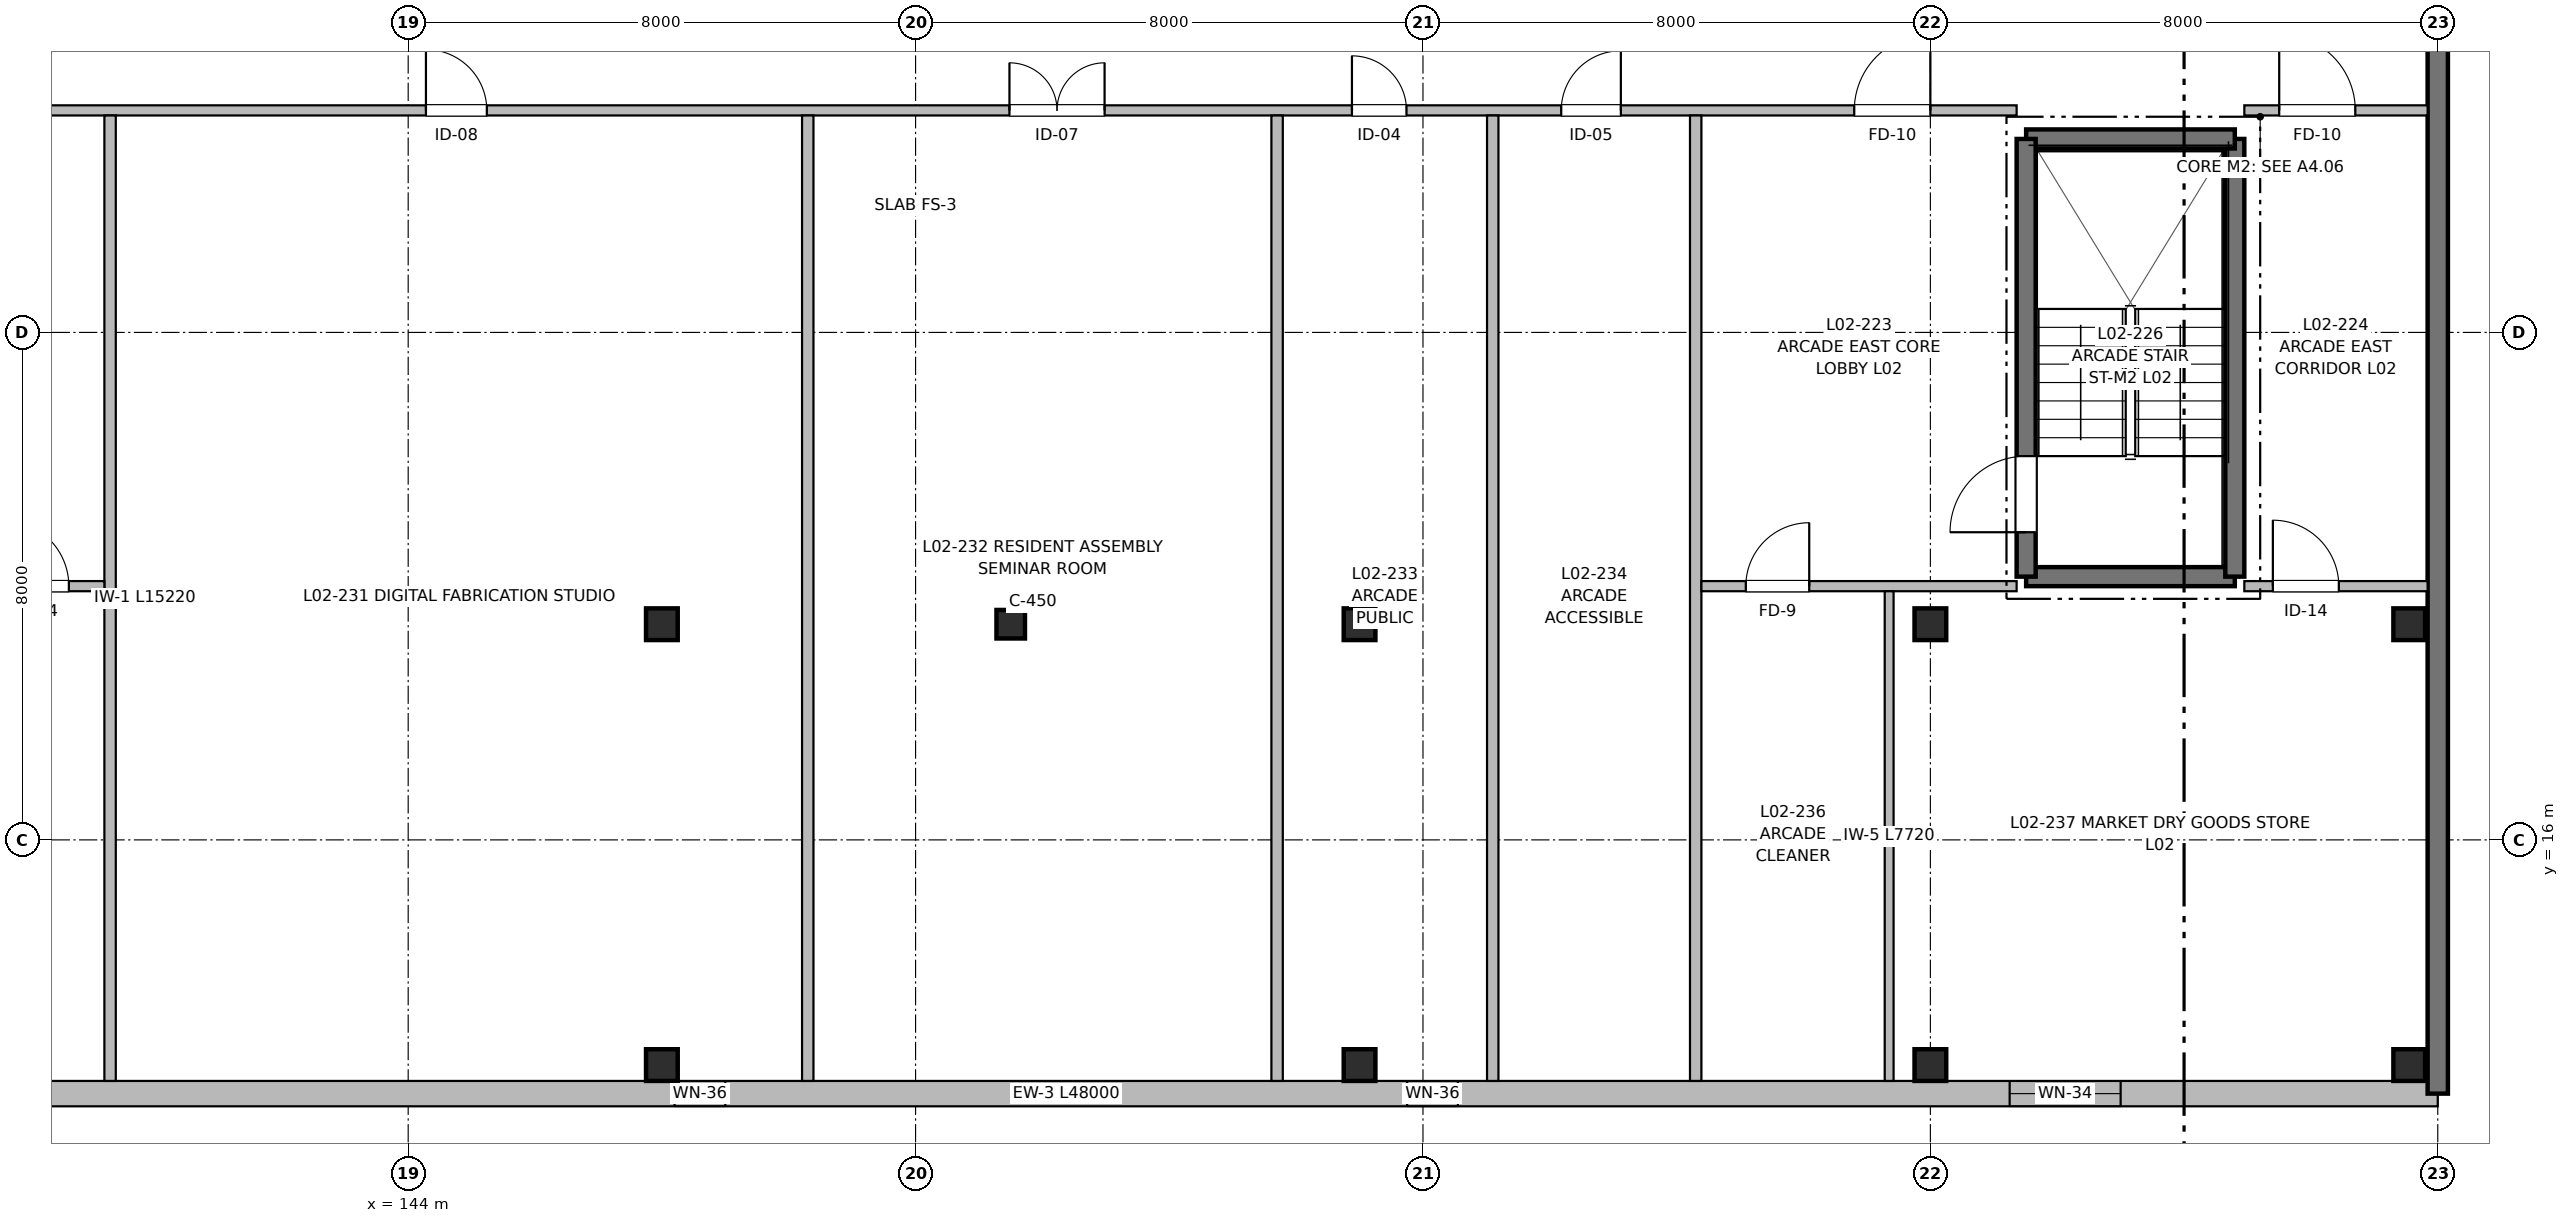
"""IFC4 building model, lengths in metres.
Left out: names, types, materials, properties, quantities, classifications, styles, units other than length and angle.
Written with IfcOpenShell. Run it as: python <this file> out.ifc"""

import sys

from ifc_helpers import new_model, si_unit, direction, frame, frame_2d, origin, origin_2d, place, context, subcontext, project, spatial, rectangle, extrude, element, fill, save


model = new_model("IFC4")
c1 = context("Model", 3, precision=1e-05, world=origin(), true_north=direction((0.0, 1.0)))
c2 = subcontext(c1, "Body", "Model", "MODEL_VIEW")
j1 = project(units=[si_unit("LENGTHUNIT", "METRE"), si_unit("PLANEANGLEUNIT", "RADIAN")], contexts=[c1])
p1 = place(None, origin())
s1 = spatial("IfcSite", under=j1, at=p1, CompositionType="ELEMENT")
p2 = place(p1, origin())
s2 = spatial("IfcBuilding", under=s1, at=p2, CompositionType="ELEMENT")
p3 = place(p2, frame((0.0, 0.0, 7.36)))
s3 = spatial("IfcBuildingStorey", under=s2, at=p3, CompositionType="ELEMENT", Elevation=7.36)
for number, where, z_axis, x_axis in (
    (1, (148.0, 12.45, 0.0), (0.0, 0.0, 1.0), (1.0, 0.0, 0.0)),
    (2, (148.0, 19.4, 0.0), (0.0, 0.0, 1.0), (1.0, 0.0, 0.0)),
):
    element("IfcColumn", number, at=place(p3, frame(where, z_axis=z_axis, x_axis=x_axis)), inside=s3, PredefinedType="COLUMN", context=c2, shape_type="SweptSolid", body=[
        extrude(rectangle(XDim=0.5, YDim=0.5, at=origin_2d()), origin(), (0.0, 0.0, 1.0), 3.2),
    ])
p4 = place(p3, frame((153.5, 19.4, 0.0), z_axis=(0.0, 0.0, 1.0), x_axis=(1.0, 0.0, 0.0)))
e3 = element("IfcColumn", 3, at=p4, inside=s3, PredefinedType="COLUMN", context=c2, shape_type="SweptSolid", body=[
    extrude(rectangle(XDim=0.45, YDim=0.45, at=origin_2d()), origin(), (0.0, 0.0, 1.0), 3.2),
])
for number, where, z_axis, x_axis in (
    (4, (159.0, 12.45, 0.0), (0.0, 0.0, 1.0), (1.0, 0.0, 0.0)),
    (5, (159.0, 19.4, 0.0), (0.0, 0.0, 1.0), (1.0, 0.0, 0.0)),
    (6, (168.0, 12.45, 0.0), (0.0, 0.0, 1.0), (1.0, 0.0, 0.0)),
    (7, (168.0, 19.4, 0.0), (0.0, 0.0, 1.0), (1.0, 0.0, 0.0)),
    (8, (175.55, 12.45, 0.0), (0.0, 0.0, 1.0), (1.0, 0.0, 0.0)),
    (9, (175.55, 19.4, 0.0), (0.0, 0.0, 1.0), (1.0, 0.0, 0.0)),
):
    element("IfcColumn", number, at=place(p3, frame(where, z_axis=z_axis, x_axis=x_axis)), inside=s3, PredefinedType="COLUMN", context=c2, shape_type="SweptSolid", body=[
        extrude(rectangle(XDim=0.5, YDim=0.5, at=origin_2d()), origin(), (0.0, 0.0, 1.0), 3.2),
    ])
p5 = place(p3, frame((176.0, 12.0, 0.0), z_axis=(0.0, 0.0, 1.0), x_axis=(-1.0, 0.0, 0.0)))
e10 = element("IfcWall", 10, at=p5, inside=s3, PredefinedType="SOLIDWALL", context=c2, shape_type="SweptSolid", body=[
    extrude(rectangle(XDim=48.0, YDim=0.4, at=frame_2d((24.0, 0.0))), origin(), (0.0, 0.0, 1.0), 2.95),
])
p6 = place(p5, frame((5.0, 0.0, 0.62)))
e11 = element("IfcOpeningElement", 11, at=p6, cuts=e10, PredefinedType="OPENING", context=c2, shape_type="SweptSolid", body=[
    extrude(rectangle(XDim=1.75, YDim=1.6, at=frame_2d((0.875, 0.8))), frame((0.0, 0.21, 0.0), z_axis=(0.0, -1.0, 0.0), x_axis=(1.0, 0.0, 0.0)), (0.0, 0.0, 1.0), 0.42),
])
p7 = place(p5, frame((15.45, 0.0, 1.52)))
e12 = element("IfcOpeningElement", 12, at=p7, cuts=e10, PredefinedType="OPENING", context=c2, shape_type="SweptSolid", body=[
    extrude(rectangle(XDim=0.8, YDim=0.7, at=frame_2d((0.4, 0.35))), frame((0.0, 0.21, 0.0), z_axis=(0.0, -1.0, 0.0), x_axis=(1.0, 0.0, 0.0)), (0.0, 0.0, 1.0), 0.42),
])
p8 = place(p5, frame((27.0, 0.0, 1.52)))
e13 = element("IfcOpeningElement", 13, at=p8, cuts=e10, PredefinedType="OPENING", context=c2, shape_type="SweptSolid", body=[
    extrude(rectangle(XDim=0.8, YDim=0.7, at=frame_2d((0.4, 0.35))), frame((0.0, 0.21, 0.0), z_axis=(0.0, -1.0, 0.0), x_axis=(1.0, 0.0, 0.0)), (0.0, 0.0, 1.0), 0.42),
])
p9 = place(p5, frame((38.0, 0.0, 0.45)))
e14 = element("IfcOpeningElement", 14, at=p9, cuts=e10, PredefinedType="OPENING", context=c2, shape_type="SweptSolid", body=[
    extrude(rectangle(XDim=1.55, YDim=1.85, at=frame_2d((0.775, 0.925))), frame((0.0, 0.21, 0.0), z_axis=(0.0, -1.0, 0.0), x_axis=(1.0, 0.0, 0.0)), (0.0, 0.0, 1.0), 0.42),
])
p10 = place(p3, frame((176.0, 40.0, 0.0), z_axis=(0.0, 0.0, 1.0), x_axis=(0.0, -1.0, 0.0)))
e15 = element("IfcWall", 15, at=p10, inside=s3, PredefinedType="SHEAR", context=c2, shape_type="SweptSolid", body=[
    extrude(rectangle(XDim=28.0, YDim=0.32, at=frame_2d((14.0, 0.0))), origin(), (0.0, 0.0, 1.0), 2.95),
])
p11 = place(p3, frame((172.8, 20.15, 0.0), z_axis=(0.0, 0.0, 1.0), x_axis=(-1.0, 0.0, 0.0)))
e16 = element("IfcWall", 16, at=p11, inside=s3, PredefinedType="SHEAR", context=c2, shape_type="SweptSolid", body=[
    extrude(rectangle(XDim=3.29, YDim=0.3, at=frame_2d((1.645, 0.0))), origin(), (0.0, 0.0, 1.0), 3.2),
])
p12 = place(p3, frame((172.8, 27.05, 0.0), z_axis=(0.0, 0.0, 1.0), x_axis=(0.0, -1.0, 0.0)))
e17 = element("IfcWall", 17, at=p12, inside=s3, PredefinedType="SHEAR", context=c2, shape_type="SweptSolid", body=[
    extrude(rectangle(XDim=6.9, YDim=0.3, at=frame_2d((3.45, 0.0))), origin(), (0.0, 0.0, 1.0), 3.2),
])
p13 = place(p3, frame((169.51, 27.05, 0.0), z_axis=(0.0, 0.0, 1.0), x_axis=(1.0, 0.0, 0.0)))
e18 = element("IfcWall", 18, at=p13, inside=s3, PredefinedType="SHEAR", context=c2, shape_type="SweptSolid", body=[
    extrude(rectangle(XDim=3.29, YDim=0.3, at=frame_2d((1.645, 0.0))), origin(), (0.0, 0.0, 1.0), 3.2),
])
p14 = place(p3, frame((169.51, 20.15, 0.0), z_axis=(0.0, 0.0, 1.0), x_axis=(0.0, 1.0, 0.0)))
e19 = element("IfcWall", 19, at=p14, inside=s3, PredefinedType="SHEAR", context=c2, shape_type="SweptSolid", body=[
    extrude(rectangle(XDim=6.9, YDim=0.3, at=frame_2d((3.45, 0.0))), origin(), (0.0, 0.0, 1.0), 3.2),
])
p15 = place(p14, frame((0.7, 0.0, 0.0)))
e20 = element("IfcOpeningElement", 20, at=p15, cuts=e19, PredefinedType="OPENING", context=c2, shape_type="SweptSolid", body=[
    extrude(rectangle(XDim=1.2, YDim=2.2, at=frame_2d((0.6, 1.1))), frame((0.0, 0.16, 0.0), z_axis=(0.0, -1.0, 0.0), x_axis=(1.0, 0.0, 0.0)), (0.0, 0.0, 1.0), 0.32),
])
p16 = place(p3, frame((133.35, 27.5, 0.0), z_axis=(0.0, 0.0, 1.0), x_axis=(1.0, 0.0, 0.0)))
e21 = element("IfcWall", 21, at=p16, inside=s3, PredefinedType="PARTITIONING", context=c2, shape_type="SweptSolid", body=[
    extrude(rectangle(XDim=36.01, YDim=0.16, at=frame_2d((18.005, 0.0))), origin(), (0.0, 0.0, 1.0), 2.93),
])
p17 = place(p16, frame((2.15, 0.0, 0.0)))
e22 = element("IfcOpeningElement", 22, at=p17, cuts=e21, PredefinedType="OPENING", context=c2, shape_type="SweptSolid", body=[
    extrude(rectangle(XDim=1.2, YDim=2.2, at=frame_2d((0.6, 1.1))), frame((0.0, 0.09, 0.0), z_axis=(0.0, -1.0, 0.0), x_axis=(1.0, 0.0, 0.0)), (0.0, 0.0, 1.0), 0.18),
])
p18 = place(p16, frame((33.45, 0.0, 0.0)))
e23 = element("IfcOpeningElement", 23, at=p18, cuts=e21, PredefinedType="OPENING", context=c2, shape_type="SweptSolid", body=[
    extrude(rectangle(XDim=1.2, YDim=2.2, at=frame_2d((0.6, 1.1))), frame((0.0, 0.09, 0.0), z_axis=(0.0, -1.0, 0.0), x_axis=(1.0, 0.0, 0.0)), (0.0, 0.0, 1.0), 0.18),
])
p19 = place(p16, frame((10.93, 0.0, 0.0)))
e24 = element("IfcOpeningElement", 24, at=p19, cuts=e21, PredefinedType="OPENING", context=c2, shape_type="SweptSolid", body=[
    extrude(rectangle(XDim=0.96, YDim=2.15, at=frame_2d((0.48, 1.075))), frame((0.0, 0.09, 0.0), z_axis=(0.0, -1.0, 0.0), x_axis=(1.0, 0.0, 0.0)), (0.0, 0.0, 1.0), 0.18),
])
p20 = place(p16, frame((20.13, 0.0, 0.0)))
e25 = element("IfcOpeningElement", 25, at=p20, cuts=e21, PredefinedType="OPENING", context=c2, shape_type="SweptSolid", body=[
    extrude(rectangle(XDim=1.5, YDim=2.2, at=frame_2d((0.75, 1.1))), frame((0.0, 0.09, 0.0), z_axis=(0.0, -1.0, 0.0), x_axis=(1.0, 0.0, 0.0)), (0.0, 0.0, 1.0), 0.18),
])
p21 = place(p16, frame((25.53, 0.0, 0.0)))
e26 = element("IfcOpeningElement", 26, at=p21, cuts=e21, PredefinedType="OPENING", context=c2, shape_type="SweptSolid", body=[
    extrude(rectangle(XDim=0.86, YDim=2.1, at=frame_2d((0.43, 1.05))), frame((0.0, 0.09, 0.0), z_axis=(0.0, -1.0, 0.0), x_axis=(1.0, 0.0, 0.0)), (0.0, 0.0, 1.0), 0.18),
])
p22 = place(p16, frame((28.83, 0.0, 0.0)))
e27 = element("IfcOpeningElement", 27, at=p22, cuts=e21, PredefinedType="OPENING", context=c2, shape_type="SweptSolid", body=[
    extrude(rectangle(XDim=0.94, YDim=2.1, at=frame_2d((0.47, 1.05))), frame((0.0, 0.09, 0.0), z_axis=(0.0, -1.0, 0.0), x_axis=(1.0, 0.0, 0.0)), (0.0, 0.0, 1.0), 0.18),
])
p23 = place(p3, frame((172.95, 27.5, 0.0), z_axis=(0.0, 0.0, 1.0), x_axis=(1.0, 0.0, 0.0)))
e28 = element("IfcWall", 28, at=p23, inside=s3, PredefinedType="PARTITIONING", context=c2, shape_type="SweptSolid", body=[
    extrude(rectangle(XDim=2.89, YDim=0.16, at=frame_2d((1.445, 0.0))), origin(), (0.0, 0.0, 1.0), 2.93),
])
p24 = place(p23, frame((0.55, 0.0, 0.0)))
e29 = element("IfcOpeningElement", 29, at=p24, cuts=e28, PredefinedType="OPENING", context=c2, shape_type="SweptSolid", body=[
    extrude(rectangle(XDim=1.2, YDim=2.2, at=frame_2d((0.6, 1.1))), frame((0.0, 0.09, 0.0), z_axis=(0.0, -1.0, 0.0), x_axis=(1.0, 0.0, 0.0)), (0.0, 0.0, 1.0), 0.18),
])
for number, where, z_axis, x_axis in (
    (30, (139.3, 12.2, 0.0), (0.0, 0.0, 1.0), (0.0, 1.0, 0.0)),
    (31, (164.3, 12.2, 0.0), (0.0, 0.0, 1.0), (0.0, 1.0, 0.0)),
    (32, (150.3, 12.2, 0.0), (0.0, 0.0, 1.0), (0.0, 1.0, 0.0)),
    (33, (157.7, 12.2, 0.0), (0.0, 0.0, 1.0), (0.0, 1.0, 0.0)),
    (34, (161.1, 12.2, 0.0), (0.0, 0.0, 1.0), (0.0, 1.0, 0.0)),
):
    element("IfcWall", number, at=place(p3, frame(where, z_axis=z_axis, x_axis=x_axis)), inside=s3, PredefinedType="PARTITIONING", context=c2, shape_type="SweptSolid", body=[
        extrude(rectangle(XDim=15.22, YDim=0.18, at=frame_2d((7.61, 0.0))), origin(), (0.0, 0.0, 1.0), 2.93),
    ])
p25 = place(p3, frame((133.35, 20.0, 0.0), z_axis=(0.0, 0.0, 1.0), x_axis=(1.0, 0.0, 0.0)))
e35 = element("IfcWall", 35, at=p25, inside=s3, PredefinedType="PARTITIONING", context=c2, shape_type="SweptSolid", body=[
    extrude(rectangle(XDim=5.86, YDim=0.16, at=frame_2d((2.93, 0.0))), origin(), (0.0, 0.0, 1.0), 2.93),
])
p26 = place(p25, frame((4.26, 0.0, 0.0)))
e36 = element("IfcOpeningElement", 36, at=p26, cuts=e35, PredefinedType="OPENING", context=c2, shape_type="SweptSolid", body=[
    extrude(rectangle(XDim=1.04, YDim=2.15, at=frame_2d((0.52, 1.075))), frame((0.0, 0.09, 0.0), z_axis=(0.0, -1.0, 0.0), x_axis=(1.0, 0.0, 0.0)), (0.0, 0.0, 1.0), 0.18),
])
p27 = place(p3, frame((164.39, 20.0, 0.0), z_axis=(0.0, 0.0, 1.0), x_axis=(1.0, 0.0, 0.0)))
e37 = element("IfcWall", 37, at=p27, inside=s3, PredefinedType="PARTITIONING", context=c2, shape_type="SweptSolid", body=[
    extrude(rectangle(XDim=4.97, YDim=0.16, at=frame_2d((2.485, 0.0))), origin(), (0.0, 0.0, 1.0), 2.93),
])
p28 = place(p27, frame((0.7, 0.0, 0.0)))
e38 = element("IfcOpeningElement", 38, at=p28, cuts=e37, PredefinedType="OPENING", context=c2, shape_type="SweptSolid", body=[
    extrude(rectangle(XDim=1.0, YDim=2.1, at=frame_2d((0.5, 1.05))), frame((0.0, 0.09, 0.0), z_axis=(0.0, -1.0, 0.0), x_axis=(1.0, 0.0, 0.0)), (0.0, 0.0, 1.0), 0.18),
])
p29 = place(p3, frame((172.95, 20.0, 0.0), z_axis=(0.0, 0.0, 1.0), x_axis=(1.0, 0.0, 0.0)))
e39 = element("IfcWall", 39, at=p29, inside=s3, PredefinedType="PARTITIONING", context=c2, shape_type="SweptSolid", body=[
    extrude(rectangle(XDim=2.89, YDim=0.16, at=frame_2d((1.445, 0.0))), origin(), (0.0, 0.0, 1.0), 2.93),
])
p30 = place(p29, frame((0.45, 0.0, 0.0)))
e40 = element("IfcOpeningElement", 40, at=p30, cuts=e39, PredefinedType="OPENING", context=c2, shape_type="SweptSolid", body=[
    extrude(rectangle(XDim=1.04, YDim=2.15, at=frame_2d((0.52, 1.075))), frame((0.0, 0.09, 0.0), z_axis=(0.0, -1.0, 0.0), x_axis=(1.0, 0.0, 0.0)), (0.0, 0.0, 1.0), 0.18),
])
p31 = place(p3, frame((167.35, 12.2, 0.0), z_axis=(0.0, 0.0, 1.0), x_axis=(0.0, 1.0, 0.0)))
e41 = element("IfcWall", 41, at=p31, inside=s3, PredefinedType="PARTITIONING", context=c2, shape_type="SweptSolid", body=[
    extrude(rectangle(XDim=7.72, YDim=0.14, at=frame_2d((3.86, 0.0))), origin(), (0.0, 0.0, 1.0), 2.93),
])
p32 = place(p6, origin())
e42 = element("IfcWindow", 42, at=p32, inside=s3, PartitioningType="SINGLE_PANEL", PredefinedType="WINDOW", context=c2, shape_type="SweptSolid", body=[
    extrude(rectangle(XDim=1.75, YDim=1.6, at=frame_2d((0.875, 0.8))), frame((0.0, 0.03, 0.0), z_axis=(0.0, -1.0, 0.0), x_axis=(1.0, 0.0, 0.0)), (0.0, 0.0, 1.0), 0.06),
])
fill(e11, e42)
p33 = place(p7, origin())
e43 = element("IfcWindow", 43, at=p33, inside=s3, PartitioningType="SINGLE_PANEL", PredefinedType="WINDOW", context=c2, shape_type="SweptSolid", body=[
    extrude(rectangle(XDim=0.8, YDim=0.7, at=frame_2d((0.4, 0.35))), frame((0.0, 0.03, 0.0), z_axis=(0.0, -1.0, 0.0), x_axis=(1.0, 0.0, 0.0)), (0.0, 0.0, 1.0), 0.06),
])
fill(e12, e43)
p34 = place(p8, origin())
e44 = element("IfcWindow", 44, at=p34, inside=s3, PartitioningType="SINGLE_PANEL", PredefinedType="WINDOW", context=c2, shape_type="SweptSolid", body=[
    extrude(rectangle(XDim=0.8, YDim=0.7, at=frame_2d((0.4, 0.35))), frame((0.0, 0.03, 0.0), z_axis=(0.0, -1.0, 0.0), x_axis=(1.0, 0.0, 0.0)), (0.0, 0.0, 1.0), 0.06),
])
fill(e13, e44)
p35 = place(p15, origin())
e45 = element("IfcDoor", 45, at=p35, inside=s3, OperationType="SINGLE_SWING_LEFT", PredefinedType="DOOR", context=c2, shape_type="SweptSolid", body=[
    extrude(rectangle(XDim=1.2, YDim=2.2, at=frame_2d((0.6, 1.1))), frame((0.0, 0.025, 0.0), z_axis=(0.0, -1.0, 0.0), x_axis=(1.0, 0.0, 0.0)), (0.0, 0.0, 1.0), 0.05),
])
fill(e20, e45)
p36 = place(p18, origin())
e46 = element("IfcDoor", 46, at=p36, inside=s3, OperationType="SINGLE_SWING_RIGHT", PredefinedType="DOOR", context=c2, shape_type="SweptSolid", body=[
    extrude(rectangle(XDim=1.2, YDim=2.2, at=frame_2d((0.6, 1.1))), frame((0.0, 0.025, 0.0), z_axis=(0.0, -1.0, 0.0), x_axis=(1.0, 0.0, 0.0)), (0.0, 0.0, 1.0), 0.05),
])
fill(e23, e46)
p37 = place(p24, origin())
e47 = element("IfcDoor", 47, at=p37, inside=s3, OperationType="SINGLE_SWING_LEFT", PredefinedType="DOOR", context=c2, shape_type="SweptSolid", body=[
    extrude(rectangle(XDim=1.2, YDim=2.2, at=frame_2d((0.6, 1.1))), frame((0.0, 0.025, 0.0), z_axis=(0.0, -1.0, 0.0), x_axis=(1.0, 0.0, 0.0)), (0.0, 0.0, 1.0), 0.05),
])
fill(e29, e47)
p38 = place(p19, origin())
e48 = element("IfcDoor", 48, at=p38, inside=s3, OperationType="SINGLE_SWING_LEFT", PredefinedType="DOOR", context=c2, shape_type="SweptSolid", body=[
    extrude(rectangle(XDim=0.96, YDim=2.15, at=frame_2d((0.48, 1.075))), frame((0.0, 0.025, 0.0), z_axis=(0.0, -1.0, 0.0), x_axis=(1.0, 0.0, 0.0)), (0.0, 0.0, 1.0), 0.05),
])
fill(e24, e48)
p39 = place(p20, origin())
e49 = element("IfcDoor", 49, at=p39, inside=s3, OperationType="DOUBLE_DOOR_SINGLE_SWING", PredefinedType="DOOR", context=c2, shape_type="SweptSolid", body=[
    extrude(rectangle(XDim=1.5, YDim=2.2, at=frame_2d((0.75, 1.1))), frame((0.0, 0.025, 0.0), z_axis=(0.0, -1.0, 0.0), x_axis=(1.0, 0.0, 0.0)), (0.0, 0.0, 1.0), 0.05),
])
fill(e25, e49)
p40 = place(p21, origin())
e50 = element("IfcDoor", 50, at=p40, inside=s3, OperationType="SINGLE_SWING_LEFT", PredefinedType="DOOR", context=c2, shape_type="SweptSolid", body=[
    extrude(rectangle(XDim=0.86, YDim=2.1, at=frame_2d((0.43, 1.05))), frame((0.0, 0.025, 0.0), z_axis=(0.0, -1.0, 0.0), x_axis=(1.0, 0.0, 0.0)), (0.0, 0.0, 1.0), 0.05),
])
fill(e26, e50)
p41 = place(p22, origin())
e51 = element("IfcDoor", 51, at=p41, inside=s3, OperationType="SINGLE_SWING_RIGHT", PredefinedType="DOOR", context=c2, shape_type="SweptSolid", body=[
    extrude(rectangle(XDim=0.94, YDim=2.1, at=frame_2d((0.47, 1.05))), frame((0.0, 0.025, 0.0), z_axis=(0.0, -1.0, 0.0), x_axis=(1.0, 0.0, 0.0)), (0.0, 0.0, 1.0), 0.05),
])
fill(e27, e51)
p42 = place(p26, origin())
e52 = element("IfcDoor", 52, at=p42, inside=s3, OperationType="SINGLE_SWING_LEFT", PredefinedType="DOOR", context=c2, shape_type="SweptSolid", body=[
    extrude(rectangle(XDim=1.04, YDim=2.15, at=frame_2d((0.52, 1.075))), frame((0.0, 0.025, 0.0), z_axis=(0.0, -1.0, 0.0), x_axis=(1.0, 0.0, 0.0)), (0.0, 0.0, 1.0), 0.05),
])
fill(e36, e52)
p43 = place(p28, origin())
e53 = element("IfcDoor", 53, at=p43, inside=s3, OperationType="SINGLE_SWING_RIGHT", PredefinedType="DOOR", context=c2, shape_type="SweptSolid", body=[
    extrude(rectangle(XDim=1.0, YDim=2.1, at=frame_2d((0.5, 1.05))), frame((0.0, 0.025, 0.0), z_axis=(0.0, -1.0, 0.0), x_axis=(1.0, 0.0, 0.0)), (0.0, 0.0, 1.0), 0.05),
])
fill(e38, e53)
p44 = place(p30, origin())
e54 = element("IfcDoor", 54, at=p44, inside=s3, OperationType="SINGLE_SWING_LEFT", PredefinedType="DOOR", context=c2, shape_type="SweptSolid", body=[
    extrude(rectangle(XDim=1.04, YDim=2.15, at=frame_2d((0.52, 1.075))), frame((0.0, 0.025, 0.0), z_axis=(0.0, -1.0, 0.0), x_axis=(1.0, 0.0, 0.0)), (0.0, 0.0, 1.0), 0.05),
])
fill(e40, e54)
save(model, sys.argv[1])
